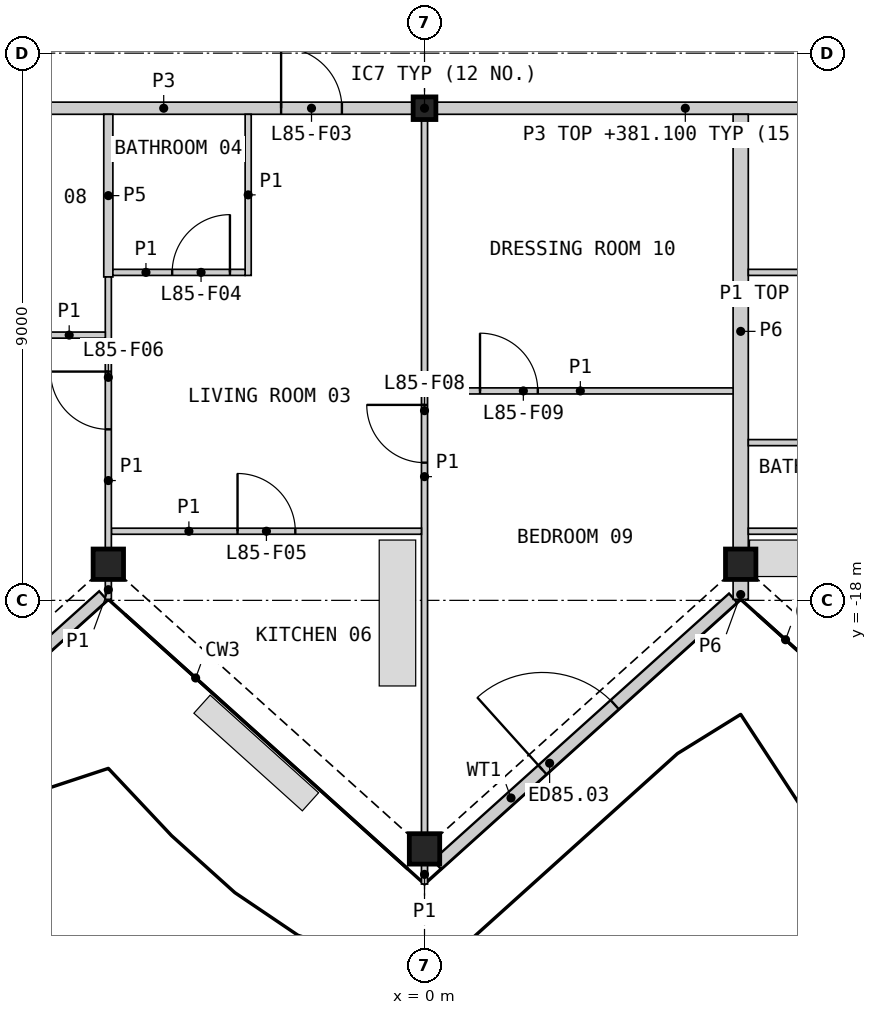
"""IFC4 building model, lengths in metres.
Left out: names, types, materials, properties, quantities, classifications, styles, units other than length and angle.
Written with IfcOpenShell. Run it as: python <this file> out.ifc"""

import sys

from ifc_helpers import new_model, si_unit, direction, frame, frame_2d, origin, origin_2d, place, context, subcontext, project, spatial, rectangle, hollow_rectangle, i_section, extrude, element, fill, save


model = new_model("IFC4")
c1 = context("Model", 3, precision=1e-05, world=origin(), true_north=direction((0.0, 1.0)))
c2 = subcontext(c1, "Body", "Model", "MODEL_VIEW")
j1 = project(units=[si_unit("LENGTHUNIT", "METRE"), si_unit("PLANEANGLEUNIT", "RADIAN")], contexts=[c1])
p1 = place(None, origin())
s1 = spatial("IfcSite", under=j1, at=p1, CompositionType="ELEMENT")
p2 = place(p1, origin())
s2 = spatial("IfcBuilding", under=s1, at=p2, CompositionType="ELEMENT")
p3 = place(p2, frame((0.0, 0.0, 378.0)))
s3 = spatial("IfcBuildingStorey", under=s2, at=p3, CompositionType="ELEMENT", Elevation=378.0)
for number, where, z_axis, x_axis in (
    (1, (-5.2, -17.406, 0.0), (0.0, 0.0, 1.0), (1.0, 0.0, 0.0)),
    (2, (0.0, -22.088, 0.0), (0.0, 0.0, 1.0), (1.0, 0.0, 0.0)),
    (3, (5.2, -17.406, 0.0), (0.0, 0.0, 1.0), (1.0, 0.0, 0.0)),
):
    element("IfcColumn", number, at=place(p3, frame(where, z_axis=z_axis, x_axis=x_axis)), inside=s3, PredefinedType="COLUMN", context=c2, shape_type="SweptSolid", body=[
        extrude(hollow_rectangle(XDim=0.5, YDim=0.5, WallThickness=0.03, at=origin_2d()), origin(), (0.0, 0.0, 1.0), 3.4),
    ])
p4 = place(p3, frame((0.0, -9.906, 0.0), z_axis=(0.0, 0.0, 1.0), x_axis=(1.0, 0.0, 0.0)))
e4 = element("IfcColumn", 4, at=p4, inside=s3, PredefinedType="COLUMN", context=c2, shape_type="SweptSolid", body=[
    extrude(i_section(OverallWidth=0.374, OverallDepth=0.372, WebThickness=0.016, FlangeThickness=0.026, at=origin_2d()), origin(), (0.0, 0.0, 1.0), 3.4),
])
p5 = place(p3, frame((-10.195, -22.346, 0.0), z_axis=(0.0, 0.0, 1.0), x_axis=(0.74313432117, 0.66914227239, 0.0)))
e5 = element("IfcWall", 5, at=p5, inside=s3, PredefinedType="SOLIDWALL", context=c2, shape_type="SweptSolid", body=[
    extrude(rectangle(XDim=6.609, YDim=0.2, at=frame_2d((3.304, 0.0))), origin(), (0.0, 0.0, 1.0), 2.634),
])
p6 = place(p5, frame((2.333, 0.0, 0.0)))
e6 = element("IfcOpeningElement", 6, at=p6, cuts=e5, PredefinedType="OPENING", context=c2, shape_type="SweptSolid", body=[
    extrude(rectangle(XDim=1.6, YDim=2.25, at=frame_2d((0.8, 1.125))), frame((0.0, 0.11, 0.0), z_axis=(0.0, -1.0, 0.0), x_axis=(1.0, 0.0, 0.0)), (0.0, 0.0, 1.0), 0.22),
])
p7 = place(p3, frame((0.205, -22.346, 0.0), z_axis=(0.0, 0.0, 1.0), x_axis=(0.74313295916, 0.669143785004, 0.0)))
e7 = element("IfcWall", 7, at=p7, inside=s3, PredefinedType="SOLIDWALL", context=c2, shape_type="SweptSolid", body=[
    extrude(rectangle(XDim=6.553, YDim=0.2, at=frame_2d((3.277, 0.0))), origin(), (0.0, 0.0, 1.0), 2.634),
])
p8 = place(p7, frame((2.333, 0.0, 0.0)))
e8 = element("IfcOpeningElement", 8, at=p8, cuts=e7, PredefinedType="OPENING", context=c2, shape_type="SweptSolid", body=[
    extrude(rectangle(XDim=1.6, YDim=2.25, at=frame_2d((0.8, 1.125))), frame((0.0, 0.11, 0.0), z_axis=(0.0, -1.0, 0.0), x_axis=(1.0, 0.0, 0.0)), (0.0, 0.0, 1.0), 0.22),
])
p9 = place(p3, frame((0.197, -9.906, 0.0), z_axis=(0.0, 0.0, 1.0), x_axis=(1.0, 0.0, 0.0)))
e9 = element("IfcWall", 9, at=p9, inside=s3, PredefinedType="PARTITIONING", context=c2, shape_type="SweptSolid", body=[
    extrude(rectangle(XDim=8.185, YDim=0.2, at=frame_2d((4.092, 0.0))), origin(), (0.0, 0.0, 1.0), 3.1),
])
p10 = place(p9, frame((6.023, 0.0, 0.0)))
e10 = element("IfcOpeningElement", 10, at=p10, cuts=e9, PredefinedType="OPENING", context=c2, shape_type="SweptSolid", body=[
    extrude(rectangle(XDim=1.0, YDim=2.1, at=frame_2d((0.5, 1.05))), frame((0.0, 0.11, 0.0), z_axis=(0.0, -1.0, 0.0), x_axis=(1.0, 0.0, 0.0)), (0.0, 0.0, 1.0), 0.22),
])
p11 = place(p3, frame((-8.382, -9.906, 0.0), z_axis=(0.0, 0.0, 1.0), x_axis=(1.0, 0.0, 0.0)))
e11 = element("IfcWall", 11, at=p11, inside=s3, PredefinedType="PARTITIONING", context=c2, shape_type="SweptSolid", body=[
    extrude(rectangle(XDim=8.185, YDim=0.2, at=frame_2d((4.092, 0.0))), origin(), (0.0, 0.0, 1.0), 3.1),
])
p12 = place(p11, frame((6.023, 0.0, 0.0)))
e12 = element("IfcOpeningElement", 12, at=p12, cuts=e11, PredefinedType="OPENING", context=c2, shape_type="SweptSolid", body=[
    extrude(rectangle(XDim=1.0, YDim=2.1, at=frame_2d((0.5, 1.05))), frame((0.0, 0.11, 0.0), z_axis=(0.0, -1.0, 0.0), x_axis=(1.0, 0.0, 0.0)), (0.0, 0.0, 1.0), 0.22),
])
p13 = place(p3, frame((5.2, -17.146, 0.0), z_axis=(0.0, 0.0, 1.0), x_axis=(0.0, 1.0, 0.0)))
e13 = element("IfcWall", 13, at=p13, inside=s3, PredefinedType="PARTITIONING", context=c2, shape_type="SweptSolid", body=[
    extrude(rectangle(XDim=7.14, YDim=0.25, at=frame_2d((3.57, 0.0))), origin(), (0.0, 0.0, 1.0), 2.33),
])
p14 = place(p3, frame((5.2, -17.983, 0.0), z_axis=(0.0, 0.0, 1.0), x_axis=(0.0, 1.0, 0.0)))
e14 = element("IfcWall", 14, at=p14, inside=s3, PredefinedType="PARTITIONING", context=c2, shape_type="SweptSolid", body=[
    extrude(rectangle(XDim=0.318, YDim=0.25, at=frame_2d((0.159, 0.0))), origin(), (0.0, 0.0, 1.0), 2.33),
])
p15 = place(p3, frame((-5.2, -12.681, 0.0), z_axis=(0.0, 0.0, 1.0), x_axis=(0.0, 1.0, 0.0)))
e15 = element("IfcWall", 15, at=p15, inside=s3, PredefinedType="PLUMBINGWALL", context=c2, shape_type="SweptSolid", body=[
    extrude(rectangle(XDim=2.675, YDim=0.15, at=frame_2d((1.337, 0.0))), origin(), (0.0, 0.0, 1.0), 2.33),
])
p16 = place(p3, frame((0.0, -21.828, 0.0), z_axis=(0.0, 0.0, 1.0), x_axis=(0.0, 1.0, 0.0)))
e16 = element("IfcWall", 16, at=p16, inside=s3, PredefinedType="PARTITIONING", context=c2, shape_type="SweptSolid", body=[
    extrude(rectangle(XDim=11.725, YDim=0.1, at=frame_2d((5.863, 0.0))), origin(), (0.0, 0.0, 1.0), 2.33),
])
p17 = place(p16, frame((6.093, 0.0, 0.0)))
e17 = element("IfcOpeningElement", 17, at=p17, cuts=e16, PredefinedType="OPENING", context=c2, shape_type="SweptSolid", body=[
    extrude(rectangle(XDim=0.95, YDim=2.1, at=frame_2d((0.475, 1.05))), frame((0.0, 0.06, 0.0), z_axis=(0.0, -1.0, 0.0), x_axis=(1.0, 0.0, 0.0)), (0.0, 0.0, 1.0), 0.12),
])
p18 = place(p3, frame((-5.15, -16.863, 0.0), z_axis=(0.0, 0.0, 1.0), x_axis=(1.0, 0.0, 0.0)))
e18 = element("IfcWall", 18, at=p18, inside=s3, PredefinedType="PARTITIONING", context=c2, shape_type="SweptSolid", body=[
    extrude(rectangle(XDim=5.1, YDim=0.1, at=frame_2d((2.55, 0.0))), origin(), (0.0, 0.0, 1.0), 2.33),
])
p19 = place(p18, frame((2.075, 0.0, 0.0)))
e19 = element("IfcOpeningElement", 19, at=p19, cuts=e18, PredefinedType="OPENING", context=c2, shape_type="SweptSolid", body=[
    extrude(rectangle(XDim=0.95, YDim=2.1, at=frame_2d((0.475, 1.05))), frame((0.0, 0.06, 0.0), z_axis=(0.0, -1.0, 0.0), x_axis=(1.0, 0.0, 0.0)), (0.0, 0.0, 1.0), 0.12),
])
p20 = place(p3, frame((5.325, -16.863, 0.0), z_axis=(0.0, 0.0, 1.0), x_axis=(1.0, 0.0, 0.0)))
e20 = element("IfcWall", 20, at=p20, inside=s3, PredefinedType="PARTITIONING", context=c2, shape_type="SweptSolid", body=[
    extrude(rectangle(XDim=5.025, YDim=0.1, at=frame_2d((2.513, 0.0))), origin(), (0.0, 0.0, 1.0), 2.33),
])
p21 = place(p20, frame((3.314, 0.0, 0.0)))
e21 = element("IfcOpeningElement", 21, at=p21, cuts=e20, PredefinedType="OPENING", context=c2, shape_type="SweptSolid", body=[
    extrude(rectangle(XDim=0.95, YDim=2.1, at=frame_2d((0.475, 1.05))), frame((0.0, 0.06, 0.0), z_axis=(0.0, -1.0, 0.0), x_axis=(1.0, 0.0, 0.0)), (0.0, 0.0, 1.0), 0.12),
])
p22 = place(p3, frame((0.05, -14.555, 0.0), z_axis=(0.0, 0.0, 1.0), x_axis=(1.0, 0.0, 0.0)))
e22 = element("IfcWall", 22, at=p22, inside=s3, PredefinedType="PARTITIONING", context=c2, shape_type="SweptSolid", body=[
    extrude(rectangle(XDim=5.025, YDim=0.1, at=frame_2d((2.512, 0.0))), origin(), (0.0, 0.0, 1.0), 2.33),
])
p23 = place(p22, frame((0.863, 0.0, 0.0)))
e23 = element("IfcOpeningElement", 23, at=p23, cuts=e22, PredefinedType="OPENING", context=c2, shape_type="SweptSolid", body=[
    extrude(rectangle(XDim=0.95, YDim=2.1, at=frame_2d((0.475, 1.05))), frame((0.0, 0.06, 0.0), z_axis=(0.0, -1.0, 0.0), x_axis=(1.0, 0.0, 0.0)), (0.0, 0.0, 1.0), 0.12),
])
p24 = place(p3, frame((-5.2, -17.146, 0.0), z_axis=(0.0, 0.0, 1.0), x_axis=(0.0, 1.0, 0.0)))
e24 = element("IfcWall", 24, at=p24, inside=s3, PredefinedType="PARTITIONING", context=c2, shape_type="SweptSolid", body=[
    extrude(rectangle(XDim=4.465, YDim=0.1, at=frame_2d((2.232, 0.0))), origin(), (0.0, 0.0, 1.0), 2.33),
])
p25 = place(p24, frame((1.958, 0.0, 0.0)))
e25 = element("IfcOpeningElement", 25, at=p25, cuts=e24, PredefinedType="OPENING", context=c2, shape_type="SweptSolid", body=[
    extrude(rectangle(XDim=0.95, YDim=2.1, at=frame_2d((0.475, 1.05))), frame((0.0, 0.06, 0.0), z_axis=(0.0, -1.0, 0.0), x_axis=(1.0, 0.0, 0.0)), (0.0, 0.0, 1.0), 0.12),
])
p26 = place(p3, frame((-2.9, -12.656, 0.0), z_axis=(0.0, 0.0, 1.0), x_axis=(0.0, 1.0, 0.0)))
e26 = element("IfcWall", 26, at=p26, inside=s3, PredefinedType="PARTITIONING", context=c2, shape_type="SweptSolid", body=[
    extrude(rectangle(XDim=2.65, YDim=0.1, at=frame_2d((1.325, 0.0))), origin(), (0.0, 0.0, 1.0), 2.33),
])
for number, where, z_axis, x_axis in (
    (27, (5.325, -12.606, 0.0), (0.0, 0.0, 1.0), (1.0, 0.0, 0.0)),
    (28, (5.325, -15.406, 0.0), (0.0, 0.0, 1.0), (1.0, 0.0, 0.0)),
):
    element("IfcWall", number, at=place(p3, frame(where, z_axis=z_axis, x_axis=x_axis)), inside=s3, PredefinedType="PARTITIONING", context=c2, shape_type="SweptSolid", body=[
        extrude(rectangle(XDim=2.525, YDim=0.1, at=frame_2d((1.263, 0.0))), origin(), (0.0, 0.0, 1.0), 2.33),
    ])
p27 = place(p3, frame((-7.625, -13.637, 0.0), z_axis=(0.0, 0.0, 1.0), x_axis=(1.0, 0.0, 0.0)))
e29 = element("IfcWall", 29, at=p27, inside=s3, PredefinedType="PARTITIONING", context=c2, shape_type="SweptSolid", body=[
    extrude(rectangle(XDim=2.375, YDim=0.1, at=frame_2d((1.188, 0.0))), origin(), (0.0, 0.0, 1.0), 2.33),
])
p28 = place(p27, frame((0.25, 0.0, 0.0)))
e30 = element("IfcOpeningElement", 30, at=p28, cuts=e29, PredefinedType="OPENING", context=c2, shape_type="SweptSolid", body=[
    extrude(rectangle(XDim=0.95, YDim=2.1, at=frame_2d((0.475, 1.05))), frame((0.0, 0.06, 0.0), z_axis=(0.0, -1.0, 0.0), x_axis=(1.0, 0.0, 0.0)), (0.0, 0.0, 1.0), 0.12),
])
p29 = place(p3, frame((-5.125, -12.606, 0.0), z_axis=(0.0, 0.0, 1.0), x_axis=(1.0, 0.0, 0.0)))
e31 = element("IfcWall", 31, at=p29, inside=s3, PredefinedType="PARTITIONING", context=c2, shape_type="SweptSolid", body=[
    extrude(rectangle(XDim=2.175, YDim=0.1, at=frame_2d((1.087, 0.0))), origin(), (0.0, 0.0, 1.0), 2.33),
])
p30 = place(p29, frame((0.975, 0.0, 0.0)))
e32 = element("IfcOpeningElement", 32, at=p30, cuts=e31, PredefinedType="OPENING", context=c2, shape_type="SweptSolid", body=[
    extrude(rectangle(XDim=0.95, YDim=2.1, at=frame_2d((0.475, 1.05))), frame((0.0, 0.06, 0.0), z_axis=(0.0, -1.0, 0.0), x_axis=(1.0, 0.0, 0.0)), (0.0, 0.0, 1.0), 0.12),
])
for number, where, z_axis, x_axis in (
    (33, (-5.2, -17.983, 0.0), (0.0, 0.0, 1.0), (0.0, 1.0, 0.0)),
    (34, (0.0, -22.666, 0.0), (0.0, 0.0, 1.0), (0.0, 1.0, 0.0)),
):
    element("IfcWall", number, at=place(p3, frame(where, z_axis=z_axis, x_axis=x_axis)), inside=s3, PredefinedType="PARTITIONING", context=c2, shape_type="SweptSolid", body=[
        extrude(rectangle(XDim=0.318, YDim=0.1, at=frame_2d((0.159, 0.0))), origin(), (0.0, 0.0, 1.0), 2.33),
    ])
p31 = place(p8, origin())
e35 = element("IfcDoor", 35, at=p31, inside=s3, OperationType="DOUBLE_DOOR_SINGLE_SWING", PredefinedType="DOOR", context=c2, shape_type="SweptSolid", body=[
    extrude(rectangle(XDim=1.6, YDim=2.25, at=frame_2d((0.8, 1.125))), frame((0.0, 0.025, 0.0), z_axis=(0.0, -1.0, 0.0), x_axis=(1.0, 0.0, 0.0)), (0.0, 0.0, 1.0), 0.05),
])
fill(e8, e35)
p32 = place(p12, origin())
e36 = element("IfcDoor", 36, at=p32, inside=s3, OperationType="SINGLE_SWING_LEFT", PredefinedType="DOOR", context=c2, shape_type="SweptSolid", body=[
    extrude(rectangle(XDim=1.0, YDim=2.1, at=frame_2d((0.5, 1.05))), frame((0.0, 0.025, 0.0), z_axis=(0.0, -1.0, 0.0), x_axis=(1.0, 0.0, 0.0)), (0.0, 0.0, 1.0), 0.05),
])
fill(e12, e36)
p33 = place(p30, origin())
e37 = element("IfcDoor", 37, at=p33, inside=s3, OperationType="SINGLE_SWING_RIGHT", PredefinedType="DOOR", context=c2, shape_type="SweptSolid", body=[
    extrude(rectangle(XDim=0.95, YDim=2.1, at=frame_2d((0.475, 1.05))), frame((0.0, 0.025, 0.0), z_axis=(0.0, -1.0, 0.0), x_axis=(1.0, 0.0, 0.0)), (0.0, 0.0, 1.0), 0.05),
])
fill(e32, e37)
p34 = place(p19, origin())
e38 = element("IfcDoor", 38, at=p34, inside=s3, OperationType="SINGLE_SWING_LEFT", PredefinedType="DOOR", context=c2, shape_type="SweptSolid", body=[
    extrude(rectangle(XDim=0.95, YDim=2.1, at=frame_2d((0.475, 1.05))), frame((0.0, 0.025, 0.0), z_axis=(0.0, -1.0, 0.0), x_axis=(1.0, 0.0, 0.0)), (0.0, 0.0, 1.0), 0.05),
])
fill(e19, e38)
p35 = place(p25, origin())
e39 = element("IfcDoor", 39, at=p35, inside=s3, OperationType="SINGLE_SWING_RIGHT", PredefinedType="DOOR", context=c2, shape_type="SweptSolid", body=[
    extrude(rectangle(XDim=0.95, YDim=2.1, at=frame_2d((0.475, 1.05))), frame((0.0, 0.025, 0.0), z_axis=(0.0, -1.0, 0.0), x_axis=(1.0, 0.0, 0.0)), (0.0, 0.0, 1.0), 0.05),
])
fill(e25, e39)
p36 = place(p17, origin())
e40 = element("IfcDoor", 40, at=p36, inside=s3, OperationType="SINGLE_SWING_RIGHT", PredefinedType="DOOR", context=c2, shape_type="SweptSolid", body=[
    extrude(rectangle(XDim=0.95, YDim=2.1, at=frame_2d((0.475, 1.05))), frame((0.0, 0.025, 0.0), z_axis=(0.0, -1.0, 0.0), x_axis=(1.0, 0.0, 0.0)), (0.0, 0.0, 1.0), 0.05),
])
fill(e17, e40)
p37 = place(p23, origin())
e41 = element("IfcDoor", 41, at=p37, inside=s3, OperationType="SINGLE_SWING_LEFT", PredefinedType="DOOR", context=c2, shape_type="SweptSolid", body=[
    extrude(rectangle(XDim=0.95, YDim=2.1, at=frame_2d((0.475, 1.05))), frame((0.0, 0.025, 0.0), z_axis=(0.0, -1.0, 0.0), x_axis=(1.0, 0.0, 0.0)), (0.0, 0.0, 1.0), 0.05),
])
fill(e23, e41)
save(model, sys.argv[1])
